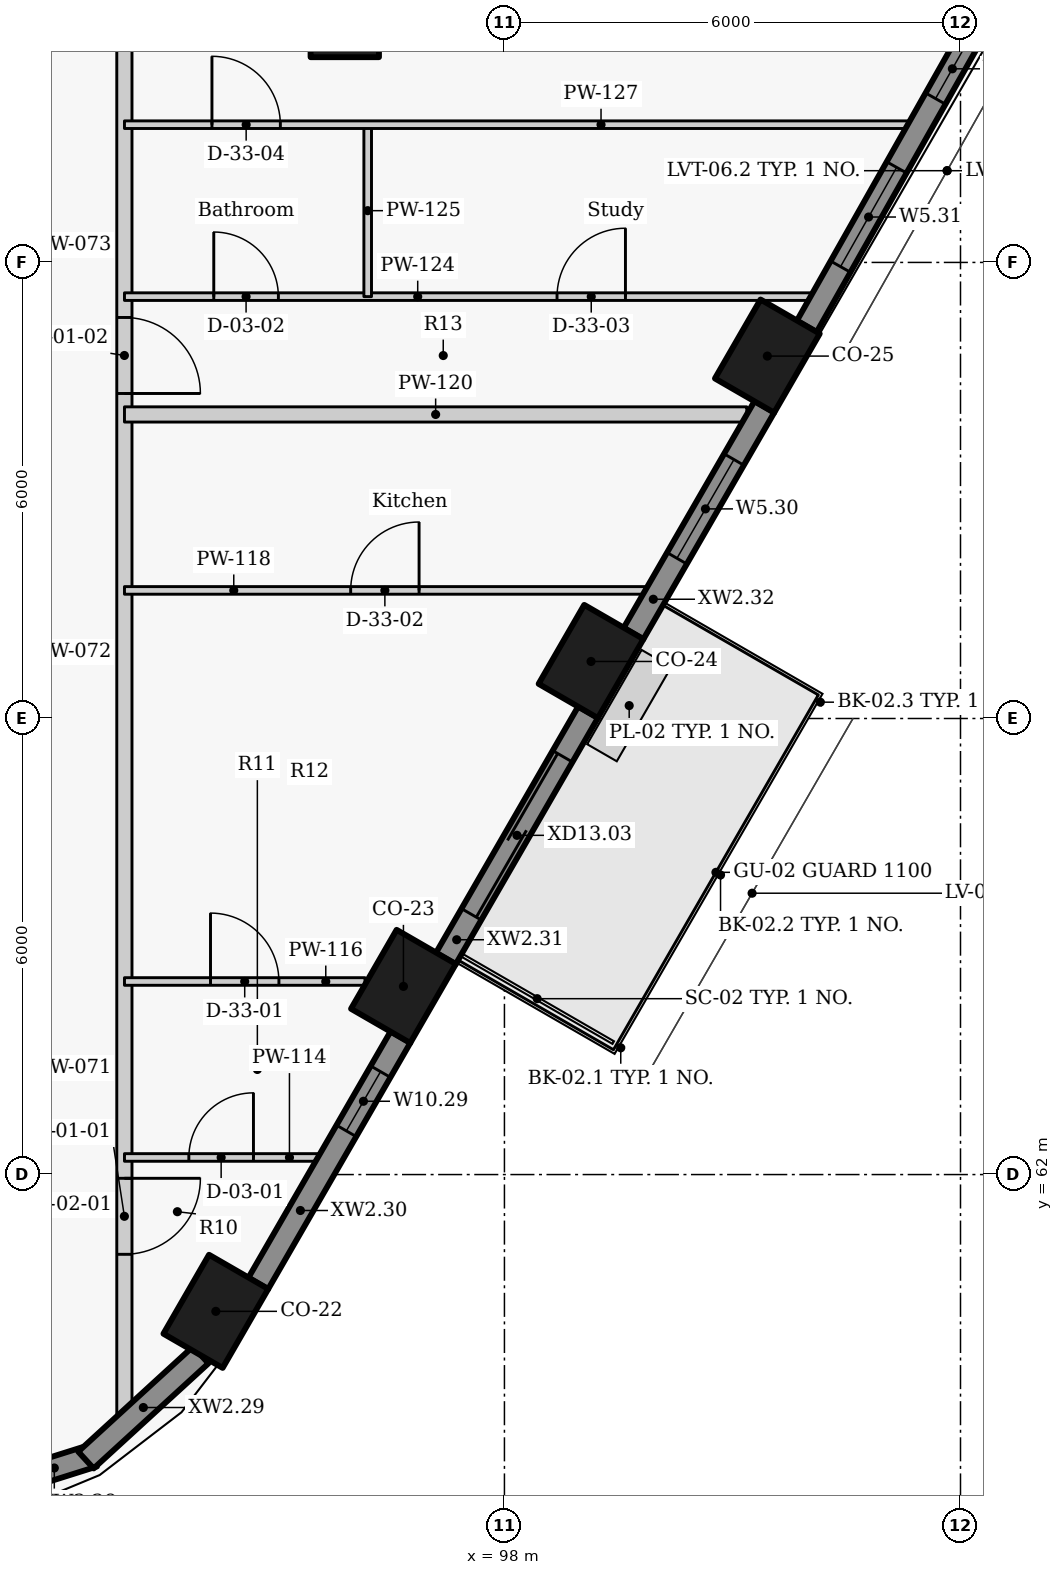
"""IFC4 building model, lengths in metres.
Left out: names, types, materials, properties, quantities, classifications, styles, units other than length and angle.
Written with IfcOpenShell. Run it as: python <this file> out.ifc"""

import sys

from ifc_helpers import new_model, si_unit, direction, frame, frame_2d, origin, origin_2d, place, context, subcontext, project, spatial, rectangle, extrude, element, fill, save


model = new_model("IFC4")
c1 = context("Model", 3, precision=1e-05, world=origin(), true_north=direction((0.0, 1.0)))
c2 = subcontext(c1, "Body", "Model", "MODEL_VIEW")
j1 = project(units=[si_unit("LENGTHUNIT", "METRE"), si_unit("PLANEANGLEUNIT", "RADIAN")], contexts=[c1])
p1 = place(None, origin())
s1 = spatial("IfcSite", under=j1, at=p1, CompositionType="ELEMENT")
p2 = place(p1, origin())
s2 = spatial("IfcBuilding", under=s1, at=p2, CompositionType="ELEMENT")
p3 = place(p2, frame((0.0, 0.0, 176.7)))
s3 = spatial("IfcBuildingStorey", under=s2, at=p3, CompositionType="ELEMENT", Elevation=176.7)
for number, where, z_axis, x_axis in (
    (1, (94.203, 60.2, 0.0), (0.0, 0.0, 1.0), (0.5, 0.866, 0.0)),
    (2, (96.671, 64.475, 0.0), (0.0, 0.0, 1.0), (0.5, 0.866, 0.0)),
    (3, (99.139, 68.75, 0.0), (0.0, 0.0, 1.0), (0.5, 0.866, 0.0)),
    (4, (101.459, 72.768, 0.0), (0.0, 0.0, 1.0), (0.5, 0.866, 0.0)),
    (5, (95.899, 77.3, 0.0), (0.0, 0.0, 1.0), (0.0, 1.0, 0.0)),
):
    element("IfcColumn", number, at=place(p3, frame(where, z_axis=z_axis, x_axis=x_axis)), inside=s3, PredefinedType="COLUMN", context=c2, shape_type="SweptSolid", body=[
        extrude(rectangle(XDim=1.2, YDim=0.9, at=origin_2d()), origin(), (0.0, 0.0, 1.0), 3.3),
    ])
p4 = place(p3, frame((90.636, 57.685, 0.0), z_axis=(0.0, 0.0, 1.0), x_axis=(0.95368324118, 0.300812691707, 0.0)))
e6 = element("IfcWall", 6, at=p4, inside=s3, PredefinedType="SOLIDWALL", context=c2, shape_type="SweptSolid", body=[
    extrude(rectangle(XDim=2.053, YDim=0.3, at=frame_2d((1.027, 0.0))), origin(), (0.0, 0.0, 1.0), 2.425),
])
p5 = place(p4, frame((0.271, 0.0, 0.9)))
e7 = element("IfcOpeningElement", 7, at=p5, cuts=e6, PredefinedType="OPENING", context=c2, shape_type="SweptSolid", body=[
    extrude(rectangle(XDim=0.6, YDim=1.1, at=frame_2d((0.3, 0.55))), frame((0.0, 0.16, 0.0), z_axis=(0.0, -1.0, 0.0), x_axis=(1.0, 0.0, 0.0)), (0.0, 0.0, 1.0), 0.32),
])
p6 = place(p3, frame((92.494, 58.244, 0.0), z_axis=(0.0, 0.0, 1.0), x_axis=(0.73764876128, 0.675184645102, 0.0)))
e8 = element("IfcWall", 8, at=p6, inside=s3, PredefinedType="SOLIDWALL", context=c2, shape_type="SweptSolid", body=[
    extrude(rectangle(XDim=2.048, YDim=0.3, at=frame_2d((1.024, 0.0))), origin(), (0.0, 0.0, 1.0), 2.425),
])
p7 = place(p3, frame((94.761, 60.567, 0.0), z_axis=(0.0, 0.0, 1.0), x_axis=(0.499982088007, 0.866035745032, 0.0)))
e9 = element("IfcWall", 9, at=p7, inside=s3, PredefinedType="SOLIDWALL", context=c2, shape_type="SweptSolid", body=[
    extrude(rectangle(XDim=3.744, YDim=0.3, at=frame_2d((1.872, 0.0))), origin(), (0.0, 0.0, 1.0), 2.425),
])
p8 = place(p7, frame((2.319, 0.0, 1.5)))
e10 = element("IfcOpeningElement", 10, at=p8, cuts=e9, PredefinedType="OPENING", context=c2, shape_type="SweptSolid", body=[
    extrude(rectangle(XDim=0.9, YDim=0.5, at=frame_2d((0.45, 0.25))), frame((0.0, 0.16, 0.0), z_axis=(0.0, -1.0, 0.0), x_axis=(1.0, 0.0, 0.0)), (0.0, 0.0, 1.0), 0.32),
])
p9 = place(p3, frame((97.229, 64.842, 0.0), z_axis=(0.0, 0.0, 1.0), x_axis=(0.500059225181, 0.86599120741, 0.0)))
e11 = element("IfcWall", 11, at=p9, inside=s3, PredefinedType="SOLIDWALL", context=c2, shape_type="SweptSolid", body=[
    extrude(rectangle(XDim=3.744, YDim=0.3, at=frame_2d((1.872, 0.0))), origin(), (0.0, 0.0, 1.0), 2.425),
])
p10 = place(p9, frame((0.672, 0.0, 0.0)))
e12 = element("IfcOpeningElement", 12, at=p10, cuts=e11, PredefinedType="OPENING", context=c2, shape_type="SweptSolid", body=[
    extrude(rectangle(XDim=2.4, YDim=2.0, at=frame_2d((1.2, 1.0))), frame((0.0, 0.16, 0.0), z_axis=(0.0, -1.0, 0.0), x_axis=(1.0, 0.0, 0.0)), (0.0, 0.0, 1.0), 0.32),
])
p11 = place(p3, frame((99.697, 69.116, 0.0), z_axis=(0.0, 0.0, 1.0), x_axis=(0.499955427682, 0.866051136095, 0.0)))
e13 = element("IfcWall", 13, at=p11, inside=s3, PredefinedType="SOLIDWALL", context=c2, shape_type="SweptSolid", body=[
    extrude(rectangle(XDim=3.447, YDim=0.3, at=frame_2d((1.724, 0.0))), origin(), (0.0, 0.0, 1.0), 2.425),
])
p12 = place(p11, frame((1.145, 0.0, 0.9)))
e14 = element("IfcOpeningElement", 14, at=p12, cuts=e13, PredefinedType="OPENING", context=c2, shape_type="SweptSolid", body=[
    extrude(rectangle(XDim=1.5, YDim=1.1, at=frame_2d((0.75, 0.55))), frame((0.0, 0.16, 0.0), z_axis=(0.0, -1.0, 0.0), x_axis=(1.0, 0.0, 0.0)), (0.0, 0.0, 1.0), 0.32),
])
p13 = place(p3, frame((101.977, 73.157, 0.0), z_axis=(0.0, 0.0, 1.0), x_axis=(0.492033360928, 0.870576344575, 0.0)))
e15 = element("IfcWall", 15, at=p13, inside=s3, PredefinedType="SOLIDWALL", context=c2, shape_type="SweptSolid", body=[
    extrude(rectangle(XDim=5.387, YDim=0.3, at=frame_2d((2.693, 0.0))), origin(), (0.0, 0.0, 1.0), 2.425),
])
p14 = place(p13, frame((0.905, 0.0, 0.9)))
e16 = element("IfcOpeningElement", 16, at=p14, cuts=e15, PredefinedType="OPENING", context=c2, shape_type="SweptSolid", body=[
    extrude(rectangle(XDim=1.5, YDim=1.1, at=frame_2d((0.75, 0.55))), frame((0.0, 0.16, 0.0), z_axis=(0.0, -1.0, 0.0), x_axis=(1.0, 0.0, 0.0)), (0.0, 0.0, 1.0), 0.32),
])
p15 = place(p13, frame((3.444, 0.0, 0.9)))
e17 = element("IfcOpeningElement", 17, at=p15, cuts=e15, PredefinedType="OPENING", context=c2, shape_type="SweptSolid", body=[
    extrude(rectangle(XDim=0.9, YDim=1.1, at=frame_2d((0.45, 0.55))), frame((0.0, 0.16, 0.0), z_axis=(0.0, -1.0, 0.0), x_axis=(1.0, 0.0, 0.0)), (0.0, 0.0, 1.0), 0.32),
])
p16 = place(p3, frame((93.0, 101.281, 0.0), z_axis=(0.0, 0.0, 1.0), x_axis=(0.0, -1.0, 0.0)))
e18 = element("IfcWall", 18, at=p16, inside=s3, PredefinedType="PARTITIONING", context=c2, shape_type="SweptSolid", body=[
    extrude(rectangle(XDim=42.606, YDim=0.2, at=frame_2d((21.303, 0.0))), origin(), (0.0, 0.0, 1.0), 2.405),
])
p17 = place(p16, frame((39.33, 0.0, 0.0)))
e19 = element("IfcOpeningElement", 19, at=p17, cuts=e18, PredefinedType="OPENING", context=c2, shape_type="SweptSolid", body=[
    extrude(rectangle(XDim=1.0, YDim=2.1, at=frame_2d((0.5, 1.05))), frame((0.0, 0.11, 0.0), z_axis=(0.0, -1.0, 0.0), x_axis=(1.0, 0.0, 0.0)), (0.0, 0.0, 1.0), 0.22),
])
p18 = place(p16, frame((28.005, 0.0, 0.0)))
e20 = element("IfcOpeningElement", 20, at=p18, cuts=e18, PredefinedType="OPENING", context=c2, shape_type="SweptSolid", body=[
    extrude(rectangle(XDim=1.0, YDim=2.1, at=frame_2d((0.5, 1.05))), frame((0.0, 0.11, 0.0), z_axis=(0.0, -1.0, 0.0), x_axis=(1.0, 0.0, 0.0)), (0.0, 0.0, 1.0), 0.22),
])
p19 = place(p16, frame((16.905, 0.0, 0.0)))
e21 = element("IfcOpeningElement", 21, at=p19, cuts=e18, PredefinedType="OPENING", context=c2, shape_type="SweptSolid", body=[
    extrude(rectangle(XDim=1.0, YDim=2.1, at=frame_2d((0.5, 1.05))), frame((0.0, 0.11, 0.0), z_axis=(0.0, -1.0, 0.0), x_axis=(1.0, 0.0, 0.0)), (0.0, 0.0, 1.0), 0.22),
])
p20 = place(p3, frame((93.001, 62.225, 0.0), z_axis=(0.0, 0.0, 1.0), x_axis=(1.0, 0.0, 0.0)))
e22 = element("IfcWall", 22, at=p20, inside=s3, PredefinedType="PARTITIONING", context=c2, shape_type="SweptSolid", body=[
    extrude(rectangle(XDim=2.544, YDim=0.1, at=frame_2d((1.272, 0.0))), origin(), (0.0, 0.0, 1.0), 2.405),
])
p21 = place(p20, frame((0.847, 0.0, 0.0)))
e23 = element("IfcOpeningElement", 23, at=p21, cuts=e22, PredefinedType="OPENING", context=c2, shape_type="SweptSolid", body=[
    extrude(rectangle(XDim=0.85, YDim=2.1, at=frame_2d((0.425, 1.05))), frame((0.0, 0.06, 0.0), z_axis=(0.0, -1.0, 0.0), x_axis=(1.0, 0.0, 0.0)), (0.0, 0.0, 1.0), 0.12),
])
p22 = place(p3, frame((93.001, 64.54, 0.0), z_axis=(0.0, 0.0, 1.0), x_axis=(1.0, 0.0, 0.0)))
e24 = element("IfcWall", 24, at=p22, inside=s3, PredefinedType="PARTITIONING", context=c2, shape_type="SweptSolid", body=[
    extrude(rectangle(XDim=3.165, YDim=0.1, at=frame_2d((1.583, 0.0))), origin(), (0.0, 0.0, 1.0), 3.025),
])
p23 = place(p22, frame((1.132, 0.0, 0.0)))
e25 = element("IfcOpeningElement", 25, at=p23, cuts=e24, PredefinedType="OPENING", context=c2, shape_type="SweptSolid", body=[
    extrude(rectangle(XDim=0.9, YDim=2.1, at=frame_2d((0.45, 1.05))), frame((0.0, 0.06, 0.0), z_axis=(0.0, -1.0, 0.0), x_axis=(1.0, 0.0, 0.0)), (0.0, 0.0, 1.0), 0.12),
])
p24 = place(p3, frame((93.001, 69.685, 0.0), z_axis=(0.0, 0.0, 1.0), x_axis=(1.0, 0.0, 0.0)))
e26 = element("IfcWall", 26, at=p24, inside=s3, PredefinedType="PARTITIONING", context=c2, shape_type="SweptSolid", body=[
    extrude(rectangle(XDim=6.851, YDim=0.1, at=frame_2d((3.426, 0.0))), origin(), (0.0, 0.0, 1.0), 2.405),
])
p25 = place(p24, frame((2.976, 0.0, 0.0)))
e27 = element("IfcOpeningElement", 27, at=p25, cuts=e26, PredefinedType="OPENING", context=c2, shape_type="SweptSolid", body=[
    extrude(rectangle(XDim=0.9, YDim=2.1, at=frame_2d((0.45, 1.05))), frame((0.0, 0.06, 0.0), z_axis=(0.0, -1.0, 0.0), x_axis=(1.0, 0.0, 0.0)), (0.0, 0.0, 1.0), 0.12),
])
p26 = place(p3, frame((93.001, 72.0, 0.0), z_axis=(0.0, 0.0, 1.0), x_axis=(1.0, 0.0, 0.0)))
e28 = element("IfcWall", 28, at=p26, inside=s3, PredefinedType="PARTITIONING", context=c2, shape_type="SweptSolid", body=[
    extrude(rectangle(XDim=8.188, YDim=0.2, at=frame_2d((4.094, 0.0))), origin(), (0.0, 0.0, 1.0), 2.405),
])
p27 = place(p3, frame((93.001, 73.55, 0.0), z_axis=(0.0, 0.0, 1.0), x_axis=(1.0, 0.0, 0.0)))
e29 = element("IfcWall", 29, at=p27, inside=s3, PredefinedType="PARTITIONING", context=c2, shape_type="SweptSolid", body=[
    extrude(rectangle(XDim=9.083, YDim=0.1, at=frame_2d((4.542, 0.0))), origin(), (0.0, 0.0, 1.0), 2.405),
])
p28 = place(p27, frame((1.175, 0.0, 0.0)))
e30 = element("IfcOpeningElement", 30, at=p28, cuts=e29, PredefinedType="OPENING", context=c2, shape_type="SweptSolid", body=[
    extrude(rectangle(XDim=0.85, YDim=2.1, at=frame_2d((0.425, 1.05))), frame((0.0, 0.06, 0.0), z_axis=(0.0, -1.0, 0.0), x_axis=(1.0, 0.0, 0.0)), (0.0, 0.0, 1.0), 0.12),
])
p29 = place(p27, frame((5.691, 0.0, 0.0)))
e31 = element("IfcOpeningElement", 31, at=p29, cuts=e29, PredefinedType="OPENING", context=c2, shape_type="SweptSolid", body=[
    extrude(rectangle(XDim=0.9, YDim=2.1, at=frame_2d((0.45, 1.05))), frame((0.0, 0.06, 0.0), z_axis=(0.0, -1.0, 0.0), x_axis=(1.0, 0.0, 0.0)), (0.0, 0.0, 1.0), 0.12),
])
p30 = place(p3, frame((96.201, 73.55, 0.0), z_axis=(0.0, 0.0, 1.0), x_axis=(0.0, 1.0, 0.0)))
e32 = element("IfcWall", 32, at=p30, inside=s3, PredefinedType="PARTITIONING", context=c2, shape_type="SweptSolid", body=[
    extrude(rectangle(XDim=2.262, YDim=0.1, at=frame_2d((1.131, 0.0))), origin(), (0.0, 0.0, 1.0), 3.025),
])
p31 = place(p3, frame((93.001, 75.812, 0.0), z_axis=(0.0, 0.0, 1.0), x_axis=(1.0, 0.0, 0.0)))
e33 = element("IfcWall", 33, at=p31, inside=s3, PredefinedType="PARTITIONING", context=c2, shape_type="SweptSolid", body=[
    extrude(rectangle(XDim=10.389, YDim=0.1, at=frame_2d((5.194, 0.0))), origin(), (0.0, 0.0, 1.0), 2.405),
])
p32 = place(p31, frame((1.151, 0.0, 0.0)))
e34 = element("IfcOpeningElement", 34, at=p32, cuts=e33, PredefinedType="OPENING", context=c2, shape_type="SweptSolid", body=[
    extrude(rectangle(XDim=0.9, YDim=2.1, at=frame_2d((0.45, 1.05))), frame((0.0, 0.06, 0.0), z_axis=(0.0, -1.0, 0.0), x_axis=(1.0, 0.0, 0.0)), (0.0, 0.0, 1.0), 0.12),
])
p33 = place(p8, origin())
e35 = element("IfcWindow", 35, at=p33, inside=s3, PartitioningType="SINGLE_PANEL", PredefinedType="WINDOW", context=c2, shape_type="SweptSolid", body=[
    extrude(rectangle(XDim=0.9, YDim=0.5, at=frame_2d((0.45, 0.25))), frame((0.0, 0.03, 0.0), z_axis=(0.0, -1.0, 0.0), x_axis=(1.0, 0.0, 0.0)), (0.0, 0.0, 1.0), 0.06),
])
fill(e10, e35)
p34 = place(p10, origin())
e36 = element("IfcDoor", 36, at=p34, inside=s3, OperationType="DOUBLE_DOOR_SLIDING", PredefinedType="DOOR", context=c2, shape_type="SweptSolid", body=[
    extrude(rectangle(XDim=2.4, YDim=2.0, at=frame_2d((1.2, 1.0))), frame((0.0, 0.025, 0.0), z_axis=(0.0, -1.0, 0.0), x_axis=(1.0, 0.0, 0.0)), (0.0, 0.0, 1.0), 0.05),
])
fill(e12, e36)
p35 = place(p12, origin())
e37 = element("IfcWindow", 37, at=p35, inside=s3, PartitioningType="SINGLE_PANEL", PredefinedType="WINDOW", context=c2, shape_type="SweptSolid", body=[
    extrude(rectangle(XDim=1.5, YDim=1.1, at=frame_2d((0.75, 0.55))), frame((0.0, 0.03, 0.0), z_axis=(0.0, -1.0, 0.0), x_axis=(1.0, 0.0, 0.0)), (0.0, 0.0, 1.0), 0.06),
])
fill(e14, e37)
p36 = place(p14, origin())
e38 = element("IfcWindow", 38, at=p36, inside=s3, PartitioningType="SINGLE_PANEL", PredefinedType="WINDOW", context=c2, shape_type="SweptSolid", body=[
    extrude(rectangle(XDim=1.5, YDim=1.1, at=frame_2d((0.75, 0.55))), frame((0.0, 0.03, 0.0), z_axis=(0.0, -1.0, 0.0), x_axis=(1.0, 0.0, 0.0)), (0.0, 0.0, 1.0), 0.06),
])
fill(e16, e38)
p37 = place(p15, origin())
e39 = element("IfcWindow", 39, at=p37, inside=s3, PartitioningType="SINGLE_PANEL", PredefinedType="WINDOW", context=c2, shape_type="SweptSolid", body=[
    extrude(rectangle(XDim=0.9, YDim=1.1, at=frame_2d((0.45, 0.55))), frame((0.0, 0.03, 0.0), z_axis=(0.0, -1.0, 0.0), x_axis=(1.0, 0.0, 0.0)), (0.0, 0.0, 1.0), 0.06),
])
fill(e17, e39)
p38 = place(p17, origin())
e40 = element("IfcDoor", 40, at=p38, inside=s3, OperationType="SINGLE_SWING_LEFT", PredefinedType="DOOR", context=c2, shape_type="SweptSolid", body=[
    extrude(rectangle(XDim=1.0, YDim=2.1, at=frame_2d((0.5, 1.05))), frame((0.0, 0.025, 0.0), z_axis=(0.0, -1.0, 0.0), x_axis=(1.0, 0.0, 0.0)), (0.0, 0.0, 1.0), 0.05),
])
fill(e19, e40)
p39 = place(p21, origin())
e41 = element("IfcDoor", 41, at=p39, inside=s3, OperationType="SINGLE_SWING_RIGHT", PredefinedType="DOOR", context=c2, shape_type="SweptSolid", body=[
    extrude(rectangle(XDim=0.85, YDim=2.1, at=frame_2d((0.425, 1.05))), frame((0.0, 0.025, 0.0), z_axis=(0.0, -1.0, 0.0), x_axis=(1.0, 0.0, 0.0)), (0.0, 0.0, 1.0), 0.05),
])
fill(e23, e41)
p40 = place(p23, origin())
e42 = element("IfcDoor", 42, at=p40, inside=s3, OperationType="SINGLE_SWING_LEFT", PredefinedType="DOOR", context=c2, shape_type="SweptSolid", body=[
    extrude(rectangle(XDim=0.9, YDim=2.1, at=frame_2d((0.45, 1.05))), frame((0.0, 0.025, 0.0), z_axis=(0.0, -1.0, 0.0), x_axis=(1.0, 0.0, 0.0)), (0.0, 0.0, 1.0), 0.05),
])
fill(e25, e42)
p41 = place(p25, origin())
e43 = element("IfcDoor", 43, at=p41, inside=s3, OperationType="SINGLE_SWING_RIGHT", PredefinedType="DOOR", context=c2, shape_type="SweptSolid", body=[
    extrude(rectangle(XDim=0.9, YDim=2.1, at=frame_2d((0.45, 1.05))), frame((0.0, 0.025, 0.0), z_axis=(0.0, -1.0, 0.0), x_axis=(1.0, 0.0, 0.0)), (0.0, 0.0, 1.0), 0.05),
])
fill(e27, e43)
p42 = place(p18, origin())
e44 = element("IfcDoor", 44, at=p42, inside=s3, OperationType="SINGLE_SWING_RIGHT", PredefinedType="DOOR", context=c2, shape_type="SweptSolid", body=[
    extrude(rectangle(XDim=1.0, YDim=2.1, at=frame_2d((0.5, 1.05))), frame((0.0, 0.025, 0.0), z_axis=(0.0, -1.0, 0.0), x_axis=(1.0, 0.0, 0.0)), (0.0, 0.0, 1.0), 0.05),
])
fill(e20, e44)
p43 = place(p28, origin())
e45 = element("IfcDoor", 45, at=p43, inside=s3, OperationType="SINGLE_SWING_LEFT", PredefinedType="DOOR", context=c2, shape_type="SweptSolid", body=[
    extrude(rectangle(XDim=0.85, YDim=2.1, at=frame_2d((0.425, 1.05))), frame((0.0, 0.025, 0.0), z_axis=(0.0, -1.0, 0.0), x_axis=(1.0, 0.0, 0.0)), (0.0, 0.0, 1.0), 0.05),
])
fill(e30, e45)
p44 = place(p29, origin())
e46 = element("IfcDoor", 46, at=p44, inside=s3, OperationType="SINGLE_SWING_RIGHT", PredefinedType="DOOR", context=c2, shape_type="SweptSolid", body=[
    extrude(rectangle(XDim=0.9, YDim=2.1, at=frame_2d((0.45, 1.05))), frame((0.0, 0.025, 0.0), z_axis=(0.0, -1.0, 0.0), x_axis=(1.0, 0.0, 0.0)), (0.0, 0.0, 1.0), 0.05),
])
fill(e31, e46)
p45 = place(p32, origin())
e47 = element("IfcDoor", 47, at=p45, inside=s3, OperationType="SINGLE_SWING_LEFT", PredefinedType="DOOR", context=c2, shape_type="SweptSolid", body=[
    extrude(rectangle(XDim=0.9, YDim=2.1, at=frame_2d((0.45, 1.05))), frame((0.0, 0.025, 0.0), z_axis=(0.0, -1.0, 0.0), x_axis=(1.0, 0.0, 0.0)), (0.0, 0.0, 1.0), 0.05),
])
fill(e34, e47)
save(model, sys.argv[1])
